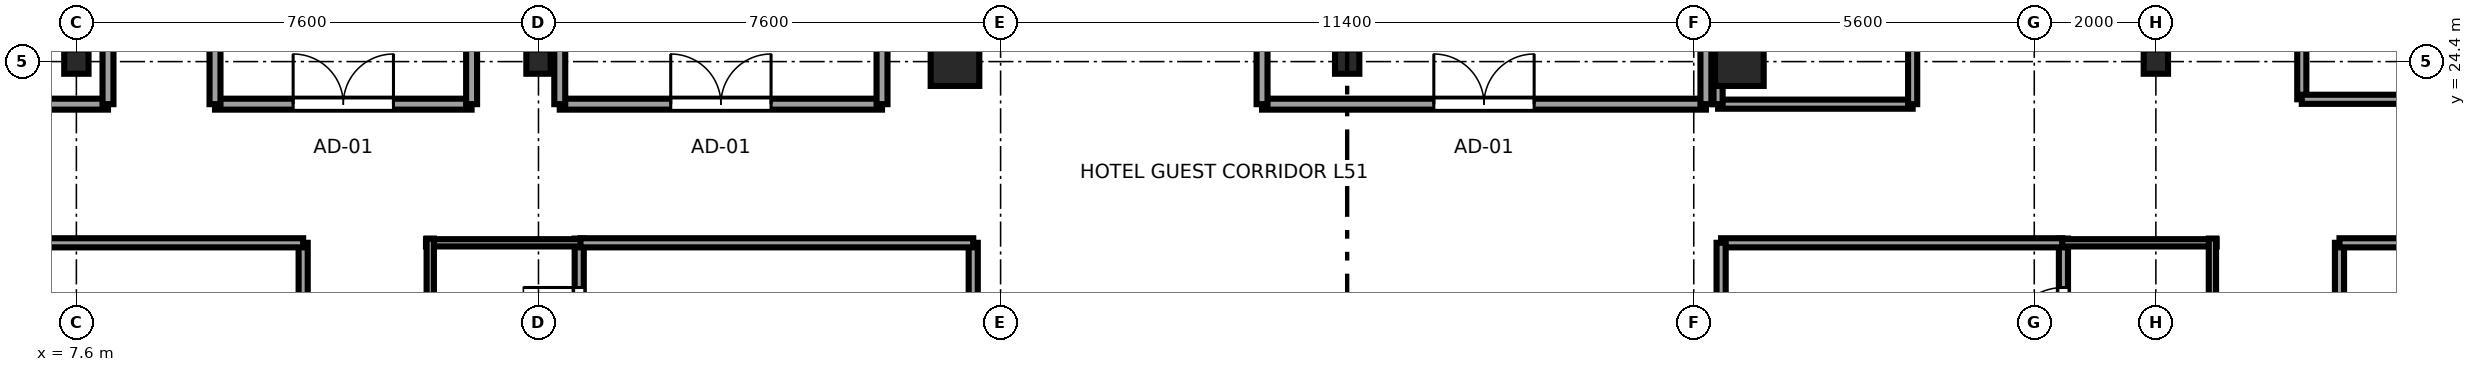
"""IFC4 building model, lengths in metres.
Left out: names, types, materials, properties, quantities, classifications, styles, units other than length and angle.
Written with IfcOpenShell. Run it as: python <this file> out.ifc"""

import sys

from ifc_helpers import new_model, si_unit, direction, frame, frame_2d, origin, origin_2d, place, context, subcontext, project, spatial, rectangle, i_section, extrude, source, transform, mapped, element, fill, save


model = new_model("IFC4")
c1 = context("Model", 3, precision=1e-05, world=origin(), true_north=direction((0.0, 1.0)))
c2 = subcontext(c1, "Body", "Model", "MODEL_VIEW")
j1 = project(units=[si_unit("LENGTHUNIT", "METRE"), si_unit("PLANEANGLEUNIT", "RADIAN")], contexts=[c1])
p1 = place(None, origin())
s1 = spatial("IfcSite", under=j1, at=p1, CompositionType="ELEMENT")
p2 = place(p1, origin())
s2 = spatial("IfcBuilding", under=s1, at=p2, CompositionType="ELEMENT")
p3 = place(p2, frame((0.0, 0.0, 194.65)))
s3 = spatial("IfcBuildingStorey", under=s2, at=p3, CompositionType="ELEMENT", Elevation=194.65)
m1 = source(origin(), c2, "Body", "SweptSolid", [
    extrude(i_section(OverallWidth=0.4, OverallDepth=0.4, WebThickness=0.02, FlangeThickness=0.035, at=origin_2d()), origin(), (0.0, 0.0, 1.0), 3.55),
])
for number, where, z_axis, x_axis in (
    (1, (7.6, 24.4, 0.0), (0.0, 0.0, 1.0), (1.0, 0.0, 0.0)),
    (2, (15.2, 24.4, 0.0), (0.0, 0.0, 1.0), (1.0, 0.0, 0.0)),
):
    element("IfcColumn", number, at=place(p3, frame(where, z_axis=z_axis, x_axis=x_axis)), inside=s3, PredefinedType="COLUMN", context=c2, shape_type="MappedRepresentation", body=[
        mapped(m1, transform((0.0, 0.0, 0.0), x_axis=(1.0, 0.0, 0.0), y_axis=(0.0, 1.0, 0.0), z_axis=(0.0, 0.0, 1.0), scale=1.0)),
    ])
m2 = source(origin(), c2, "Body", "SweptSolid", [
    extrude(rectangle(XDim=0.8, YDim=0.8, at=origin_2d()), origin(), (0.0, 0.0, 1.0), 3.55),
])
for number, where, z_axis, x_axis in (
    (3, (22.05, 24.4, 0.0), (0.0, 0.0, 1.0), (1.0, 0.0, 0.0)),
    (4, (34.95, 24.4, 0.0), (0.0, 0.0, 1.0), (1.0, 0.0, 0.0)),
):
    element("IfcColumn", number, at=place(p3, frame(where, z_axis=z_axis, x_axis=x_axis)), inside=s3, PredefinedType="COLUMN", context=c2, shape_type="MappedRepresentation", body=[
        mapped(m2, transform((0.0, 0.0, 0.0), x_axis=(1.0, 0.0, 0.0), y_axis=(0.0, 1.0, 0.0), z_axis=(0.0, 0.0, 1.0), scale=1.0)),
    ])
for number, where, z_axis, x_axis in (
    (5, (41.8, 24.4, 0.0), (0.0, 0.0, 1.0), (1.0, 0.0, 0.0)),
    (6, (28.5, 24.4, 0.0), (0.0, 0.0, 1.0), (1.0, 0.0, 0.0)),
):
    element("IfcColumn", number, at=place(p3, frame(where, z_axis=z_axis, x_axis=x_axis)), inside=s3, PredefinedType="COLUMN", context=c2, shape_type="MappedRepresentation", body=[
        mapped(m1, transform((0.0, 0.0, 0.0), x_axis=(1.0, 0.0, 0.0), y_axis=(0.0, 1.0, 0.0), z_axis=(0.0, 0.0, 1.0), scale=1.0)),
    ])
p4 = place(p3, frame((15.87, 19.1, 0.0), z_axis=(0.0, 0.0, 1.0), x_axis=(0.0, 1.0, 0.0)))
e7 = element("IfcWall", 7, at=p4, inside=s3, PredefinedType="PARTITIONING", context=c2, shape_type="SweptSolid", body=[
    extrude(rectangle(XDim=2.39, YDim=0.15, at=frame_2d((1.195, 0.0))), origin(), (0.0, 0.0, 1.0), 3.37),
])
p5 = place(p4, frame((0.665, 0.0, 0.0)))
e8 = element("IfcOpeningElement", 8, at=p5, cuts=e7, PredefinedType="OPENING", context=c2, shape_type="SweptSolid", body=[
    extrude(rectangle(XDim=0.92, YDim=2.01, at=frame_2d((0.46, 1.005))), frame((0.0, 0.085, 0.0), z_axis=(0.0, -1.0, 0.0), x_axis=(1.0, 0.0, 0.0)), (0.0, 0.0, 1.0), 0.17),
])
p6 = place(p3, frame((13.35, 21.42, 0.0), z_axis=(0.0, 0.0, 1.0), x_axis=(1.0, 0.0, 0.0)))
e9 = element("IfcWall", 9, at=p6, inside=s3, PredefinedType="PLUMBINGWALL", context=c2, shape_type="SweptSolid", body=[
    extrude(rectangle(XDim=2.59, YDim=0.12, at=frame_2d((1.295, 0.0))), origin(), (0.0, 0.0, 1.0), 3.37),
])
p7 = place(p3, frame((13.42, 19.1, 0.0), z_axis=(0.0, 0.0, 1.0), x_axis=(0.0, 1.0, 0.0)))
e10 = element("IfcWall", 10, at=p7, inside=s3, PredefinedType="PLUMBINGWALL", context=c2, shape_type="SweptSolid", body=[
    extrude(rectangle(XDim=2.39, YDim=0.12, at=frame_2d((1.195, 0.0))), origin(), (0.0, 0.0, 1.0), 3.37),
])
p8 = place(p3, frame((40.28, 19.1, 0.0), z_axis=(0.0, 0.0, 1.0), x_axis=(0.0, 1.0, 0.0)))
e11 = element("IfcWall", 11, at=p8, inside=s3, PredefinedType="PARTITIONING", context=c2, shape_type="SweptSolid", body=[
    extrude(rectangle(XDim=2.39, YDim=0.15, at=frame_2d((1.195, 0.0))), origin(), (0.0, 0.0, 1.0), 3.37),
])
p9 = place(p8, frame((0.665, 0.0, 0.0)))
e12 = element("IfcOpeningElement", 12, at=p9, cuts=e11, PredefinedType="OPENING", context=c2, shape_type="SweptSolid", body=[
    extrude(rectangle(XDim=0.92, YDim=2.01, at=frame_2d((0.46, 1.005))), frame((0.0, 0.085, 0.0), z_axis=(0.0, -1.0, 0.0), x_axis=(1.0, 0.0, 0.0)), (0.0, 0.0, 1.0), 0.17),
])
p10 = place(p3, frame((40.21, 21.42, 0.0), z_axis=(0.0, 0.0, 1.0), x_axis=(1.0, 0.0, 0.0)))
e13 = element("IfcWall", 13, at=p10, inside=s3, PredefinedType="PLUMBINGWALL", context=c2, shape_type="SweptSolid", body=[
    extrude(rectangle(XDim=2.59, YDim=0.12, at=frame_2d((1.295, 0.0))), origin(), (0.0, 0.0, 1.0), 3.37),
])
p11 = place(p3, frame((42.73, 19.1, 0.0), z_axis=(0.0, 0.0, 1.0), x_axis=(0.0, 1.0, 0.0)))
e14 = element("IfcWall", 14, at=p11, inside=s3, PredefinedType="PLUMBINGWALL", context=c2, shape_type="SweptSolid", body=[
    extrude(rectangle(XDim=2.39, YDim=0.12, at=frame_2d((1.195, 0.0))), origin(), (0.0, 0.0, 1.0), 3.37),
])
p12 = place(p3, frame((11.33, 14.61, 0.0), z_axis=(0.0, 0.0, 1.0), x_axis=(0.0, 1.0, 0.0)))
e15 = element("IfcWall", 15, at=p12, inside=s3, PredefinedType="PARTITIONING", context=c2, shape_type="SweptSolid", body=[
    extrude(rectangle(XDim=6.81, YDim=0.15, at=frame_2d((3.405, 0.0))), origin(), (0.0, 0.0, 1.0), 3.001),
])
p13 = place(p12, frame((2.895, 0.0, 0.0)))
e16 = element("IfcOpeningElement", 16, at=p13, cuts=e15, PredefinedType="OPENING", context=c2, shape_type="SweptSolid", body=[
    extrude(rectangle(XDim=0.98, YDim=2.12, at=frame_2d((0.49, 1.06))), frame((0.0, 0.085, 0.0), z_axis=(0.0, -1.0, 0.0), x_axis=(1.0, 0.0, 0.0)), (0.0, 0.0, 1.0), 0.17),
])
p14 = place(p3, frame((2.9, 21.42, 0.0), z_axis=(0.0, 0.0, 1.0), x_axis=(1.0, 0.0, 0.0)))
e17 = element("IfcWall", 17, at=p14, inside=s3, PredefinedType="PARTITIONING", context=c2, shape_type="SweptSolid", body=[
    extrude(rectangle(XDim=8.43, YDim=0.15, at=frame_2d((4.215, 0.0))), origin(), (0.0, 0.0, 1.0), 3.37),
])
p15 = place(p3, frame((22.35, 15.48, 0.0), z_axis=(0.0, 0.0, 1.0), x_axis=(0.0, 1.0, 0.0)))
e18 = element("IfcWall", 18, at=p15, inside=s3, PredefinedType="PARTITIONING", context=c2, shape_type="SweptSolid", body=[
    extrude(rectangle(XDim=5.94, YDim=0.15, at=frame_2d((2.97, 0.0))), origin(), (0.0, 0.0, 1.0), 3.37),
])
p16 = place(p3, frame((15.89, 21.42, 0.0), z_axis=(0.0, 0.0, 1.0), x_axis=(1.0, 0.0, 0.0)))
e19 = element("IfcWall", 19, at=p16, inside=s3, PredefinedType="PARTITIONING", context=c2, shape_type="SweptSolid", body=[
    extrude(rectangle(XDim=6.46, YDim=0.15, at=frame_2d((3.23, 0.0))), origin(), (0.0, 0.0, 1.0), 3.37),
])
p17 = place(p3, frame((34.65, 21.42, 0.0), z_axis=(0.0, 0.0, 1.0), x_axis=(1.0, 0.0, 0.0)))
e20 = element("IfcWall", 20, at=p17, inside=s3, PredefinedType="PARTITIONING", context=c2, shape_type="SweptSolid", body=[
    extrude(rectangle(XDim=5.61, YDim=0.15, at=frame_2d((2.805, 0.0))), origin(), (0.0, 0.0, 1.0), 3.37),
])
p18 = place(p3, frame((34.65, 15.28, 0.0), z_axis=(0.0, 0.0, 1.0), x_axis=(0.0, 1.0, 0.0)))
e21 = element("IfcWall", 21, at=p18, inside=s3, PredefinedType="PARTITIONING", context=c2, shape_type="SweptSolid", body=[
    extrude(rectangle(XDim=6.14, YDim=0.15, at=frame_2d((3.07, 0.0))), origin(), (0.0, 0.0, 1.0), 3.37),
])
p19 = place(p3, frame((44.82, 14.61, 0.0), z_axis=(0.0, 0.0, 1.0), x_axis=(0.0, 1.0, 0.0)))
e22 = element("IfcWall", 22, at=p19, inside=s3, PredefinedType="PARTITIONING", context=c2, shape_type="SweptSolid", body=[
    extrude(rectangle(XDim=6.81, YDim=0.15, at=frame_2d((3.405, 0.0))), origin(), (0.0, 0.0, 1.0), 3.37),
])
p20 = place(p19, frame((2.895, 0.0, 0.0)))
e23 = element("IfcOpeningElement", 23, at=p20, cuts=e22, PredefinedType="OPENING", context=c2, shape_type="SweptSolid", body=[
    extrude(rectangle(XDim=0.98, YDim=2.12, at=frame_2d((0.49, 1.06))), frame((0.0, 0.085, 0.0), z_axis=(0.0, -1.0, 0.0), x_axis=(1.0, 0.0, 0.0)), (0.0, 0.0, 1.0), 0.17),
])
p21 = place(p3, frame((44.82, 21.42, 0.0), z_axis=(0.0, 0.0, 1.0), x_axis=(1.0, 0.0, 0.0)))
e24 = element("IfcWall", 24, at=p21, inside=s3, PredefinedType="PARTITIONING", context=c2, shape_type="SweptSolid", body=[
    extrude(rectangle(XDim=9.175, YDim=0.15, at=frame_2d((4.587, 0.0))), origin(), (0.0, 0.0, 1.0), 3.37),
])
p22 = place(p3, frame((2.9, 23.7, 0.0), z_axis=(0.0, 0.0, 1.0), x_axis=(1.0, 0.0, 0.0)))
e25 = element("IfcWall", 25, at=p22, inside=s3, PredefinedType="PARTITIONING", context=c2, shape_type="SweptSolid", body=[
    extrude(rectangle(XDim=5.22, YDim=0.18, at=frame_2d((2.61, 0.0))), origin(), (0.0, 0.0, 1.0), 3.37),
])
p23 = place(p3, frame((8.12, 23.7, 0.0), z_axis=(0.0, 0.0, 1.0), x_axis=(0.0, 1.0, 0.0)))
e26 = element("IfcWall", 26, at=p23, inside=s3, PredefinedType="PARTITIONING", context=c2, shape_type="SweptSolid", body=[
    extrude(rectangle(XDim=7.5, YDim=0.18, at=frame_2d((3.75, 0.0))), origin(), (0.0, 0.0, 1.0), 3.37),
])
p24 = place(p23, frame((2.925, 0.0, 0.0)))
e27 = element("IfcOpeningElement", 27, at=p24, cuts=e26, PredefinedType="OPENING", context=c2, shape_type="SweptSolid", body=[
    extrude(rectangle(XDim=1.65, YDim=2.15, at=frame_2d((0.825, 1.075))), frame((0.0, 0.1, 0.0), z_axis=(0.0, -1.0, 0.0), x_axis=(1.0, 0.0, 0.0)), (0.0, 0.0, 1.0), 0.2),
])
p25 = place(p3, frame((44.2, 23.78, 0.0), z_axis=(0.0, 0.0, 1.0), x_axis=(0.0, 1.0, 0.0)))
e28 = element("IfcWall", 28, at=p25, inside=s3, PredefinedType="PARTITIONING", context=c2, shape_type="SweptSolid", body=[
    extrude(rectangle(XDim=8.29, YDim=0.15, at=frame_2d((4.145, 0.0))), origin(), (0.0, 0.0, 1.0), 3.37),
])
p26 = place(p25, frame((3.655, 0.0, 0.0)))
e29 = element("IfcOpeningElement", 29, at=p26, cuts=e28, PredefinedType="OPENING", context=c2, shape_type="SweptSolid", body=[
    extrude(rectangle(XDim=0.98, YDim=2.12, at=frame_2d((0.49, 1.06))), frame((0.0, 0.085, 0.0), z_axis=(0.0, -1.0, 0.0), x_axis=(1.0, 0.0, 0.0)), (0.0, 0.0, 1.0), 0.17),
])
p27 = place(p3, frame((44.2, 23.78, 0.0), z_axis=(0.0, 0.0, 1.0), x_axis=(1.0, 0.0, 0.0)))
e30 = element("IfcWall", 30, at=p27, inside=s3, PredefinedType="PARTITIONING", context=c2, shape_type="SweptSolid", body=[
    extrude(rectangle(XDim=9.795, YDim=0.15, at=frame_2d((4.897, 0.0))), origin(), (0.0, 0.0, 1.0), 3.37),
])
p28 = place(p3, frame((9.88, 23.7, 0.0), z_axis=(0.0, 0.0, 1.0), x_axis=(1.0, 0.0, 0.0)))
e31 = element("IfcWall", 31, at=p28, inside=s3, PredefinedType="PARTITIONING", context=c2, shape_type="SweptSolid", body=[
    extrude(rectangle(XDim=4.22, YDim=0.18, at=frame_2d((2.11, 0.0))), origin(), (0.0, 0.0, 1.0), 3.37),
])
p29 = place(p28, frame((1.285, 0.0, 0.0)))
e32 = element("IfcOpeningElement", 32, at=p29, cuts=e31, PredefinedType="OPENING", context=c2, shape_type="SweptSolid", body=[
    extrude(rectangle(XDim=1.65, YDim=2.15, at=frame_2d((0.825, 1.075))), frame((0.0, 0.1, 0.0), z_axis=(0.0, -1.0, 0.0), x_axis=(1.0, 0.0, 0.0)), (0.0, 0.0, 1.0), 0.2),
])
for number, where, z_axis, x_axis in (
    (33, (9.88, 23.7, 0.0), (0.0, 0.0, 1.0), (0.0, 1.0, 0.0)),
    (34, (14.1, 23.7, 0.0), (0.0, 0.0, 1.0), (0.0, 1.0, 0.0)),
):
    element("IfcWall", number, at=place(p3, frame(where, z_axis=z_axis, x_axis=x_axis)), inside=s3, PredefinedType="PARTITIONING", context=c2, shape_type="SweptSolid", body=[
        extrude(rectangle(XDim=6.05, YDim=0.18, at=frame_2d((3.025, 0.0))), origin(), (0.0, 0.0, 1.0), 3.37),
    ])
p30 = place(p3, frame((27.1, 23.7, 0.0), z_axis=(0.0, 0.0, 1.0), x_axis=(1.0, 0.0, 0.0)))
e35 = element("IfcWall", 35, at=p30, inside=s3, PredefinedType="PARTITIONING", context=c2, shape_type="SweptSolid", body=[
    extrude(rectangle(XDim=7.3, YDim=0.18, at=frame_2d((3.65, 0.0))), origin(), (0.0, 0.0, 1.0), 3.37),
])
p31 = place(p30, frame((2.825, 0.0, 0.0)))
e36 = element("IfcOpeningElement", 36, at=p31, cuts=e35, PredefinedType="OPENING", context=c2, shape_type="SweptSolid", body=[
    extrude(rectangle(XDim=1.65, YDim=2.15, at=frame_2d((0.825, 1.075))), frame((0.0, 0.1, 0.0), z_axis=(0.0, -1.0, 0.0), x_axis=(1.0, 0.0, 0.0)), (0.0, 0.0, 1.0), 0.2),
])
for number, where, z_axis, x_axis in (
    (37, (27.1, 23.7, 0.0), (0.0, 0.0, 1.0), (0.0, 1.0, 0.0)),
    (38, (34.4, 23.7, 0.0), (0.0, 0.0, 1.0), (0.0, 1.0, 0.0)),
):
    element("IfcWall", number, at=place(p3, frame(where, z_axis=z_axis, x_axis=x_axis)), inside=s3, PredefinedType="PARTITIONING", context=c2, shape_type="SweptSolid", body=[
        extrude(rectangle(XDim=6.1, YDim=0.18, at=frame_2d((3.05, 0.0))), origin(), (0.0, 0.0, 1.0), 3.37),
    ])
p32 = place(p3, frame((15.55, 23.7, 0.0), z_axis=(0.0, 0.0, 1.0), x_axis=(1.0, 0.0, 0.0)))
e39 = element("IfcWall", 39, at=p32, inside=s3, PredefinedType="PARTITIONING", context=c2, shape_type="SweptSolid", body=[
    extrude(rectangle(XDim=5.3, YDim=0.18, at=frame_2d((2.65, 0.0))), origin(), (0.0, 0.0, 1.0), 3.37),
])
p33 = place(p32, frame((1.825, 0.0, 0.0)))
e40 = element("IfcOpeningElement", 40, at=p33, cuts=e39, PredefinedType="OPENING", context=c2, shape_type="SweptSolid", body=[
    extrude(rectangle(XDim=1.65, YDim=2.15, at=frame_2d((0.825, 1.075))), frame((0.0, 0.1, 0.0), z_axis=(0.0, -1.0, 0.0), x_axis=(1.0, 0.0, 0.0)), (0.0, 0.0, 1.0), 0.2),
])
for number, where, z_axis, x_axis in (
    (41, (15.55, 23.7, 0.0), (0.0, 0.0, 1.0), (0.0, 1.0, 0.0)),
    (42, (20.85, 23.7, 0.0), (0.0, 0.0, 1.0), (0.0, 1.0, 0.0)),
):
    element("IfcWall", number, at=place(p3, frame(where, z_axis=z_axis, x_axis=x_axis)), inside=s3, PredefinedType="PARTITIONING", context=c2, shape_type="SweptSolid", body=[
        extrude(rectangle(XDim=6.1, YDim=0.18, at=frame_2d((3.05, 0.0))), origin(), (0.0, 0.0, 1.0), 3.37),
    ])
p34 = place(p3, frame((34.6, 23.7, 0.0), z_axis=(0.0, 0.0, 1.0), x_axis=(1.0, 0.0, 0.0)))
e43 = element("IfcWall", 43, at=p34, inside=s3, PredefinedType="PARTITIONING", context=c2, shape_type="SweptSolid", body=[
    extrude(rectangle(XDim=3.2, YDim=0.15, at=frame_2d((1.6, 0.0))), origin(), (0.0, 0.0, 1.0), 3.37),
])
for number, where, z_axis, x_axis in (
    (44, (34.6, 23.7, 0.0), (0.0, 0.0, 1.0), (0.0, 1.0, 0.0)),
    (45, (37.8, 23.7, 0.0), (0.0, 0.0, 1.0), (0.0, 1.0, 0.0)),
):
    element("IfcWall", number, at=place(p3, frame(where, z_axis=z_axis, x_axis=x_axis)), inside=s3, PredefinedType="PARTITIONING", context=c2, shape_type="SweptSolid", body=[
        extrude(rectangle(XDim=5.7, YDim=0.15, at=frame_2d((2.85, 0.0))), origin(), (0.0, 0.0, 1.0), 3.37),
    ])
m3 = source(origin(), c2, "Body", "SweptSolid", [
    extrude(rectangle(XDim=0.92, YDim=2.01, at=frame_2d((0.46, 1.005))), frame((0.0, 0.025, 0.0), z_axis=(0.0, -1.0, 0.0), x_axis=(1.0, 0.0, 0.0)), (0.0, 0.0, 1.0), 0.05),
])
p35 = place(p5, origin())
e46 = element("IfcDoor", 46, at=p35, inside=s3, OperationType="SINGLE_SWING_RIGHT", PredefinedType="DOOR", context=c2, shape_type="MappedRepresentation", body=[
    mapped(m3, transform((0.0, 0.0, 0.0), x_axis=(1.0, 0.0, 0.0), y_axis=(0.0, 1.0, 0.0), z_axis=(0.0, 0.0, 1.0), scale=1.0)),
])
fill(e8, e46)
p36 = place(p9, origin())
e47 = element("IfcDoor", 47, at=p36, inside=s3, OperationType="SINGLE_SWING_LEFT", PredefinedType="DOOR", context=c2, shape_type="MappedRepresentation", body=[
    mapped(m3, transform((0.0, 0.0, 0.0), x_axis=(1.0, 0.0, 0.0), y_axis=(0.0, 1.0, 0.0), z_axis=(0.0, 0.0, 1.0), scale=1.0)),
])
fill(e12, e47)
m4 = source(origin(), c2, "Body", "SweptSolid", [
    extrude(rectangle(XDim=1.65, YDim=2.15, at=frame_2d((0.825, 1.075))), frame((0.0, 0.025, 0.0), z_axis=(0.0, -1.0, 0.0), x_axis=(1.0, 0.0, 0.0)), (0.0, 0.0, 1.0), 0.05),
])
p37 = place(p29, origin())
e48 = element("IfcDoor", 48, at=p37, inside=s3, OperationType="DOUBLE_DOOR_SINGLE_SWING", PredefinedType="DOOR", context=c2, shape_type="MappedRepresentation", body=[
    mapped(m4, transform((0.0, 0.0, 0.0), x_axis=(1.0, 0.0, 0.0), y_axis=(0.0, 1.0, 0.0), z_axis=(0.0, 0.0, 1.0), scale=1.0)),
])
fill(e32, e48)
p38 = place(p31, origin())
e49 = element("IfcDoor", 49, at=p38, inside=s3, OperationType="DOUBLE_DOOR_SINGLE_SWING", PredefinedType="DOOR", context=c2, shape_type="MappedRepresentation", body=[
    mapped(m4, transform((0.0, 0.0, 0.0), x_axis=(1.0, 0.0, 0.0), y_axis=(0.0, 1.0, 0.0), z_axis=(0.0, 0.0, 1.0), scale=1.0)),
])
fill(e36, e49)
p39 = place(p33, origin())
e50 = element("IfcDoor", 50, at=p39, inside=s3, OperationType="DOUBLE_DOOR_SINGLE_SWING", PredefinedType="DOOR", context=c2, shape_type="MappedRepresentation", body=[
    mapped(m4, transform((0.0, 0.0, 0.0), x_axis=(1.0, 0.0, 0.0), y_axis=(0.0, 1.0, 0.0), z_axis=(0.0, 0.0, 1.0), scale=1.0)),
])
fill(e40, e50)
save(model, sys.argv[1])
